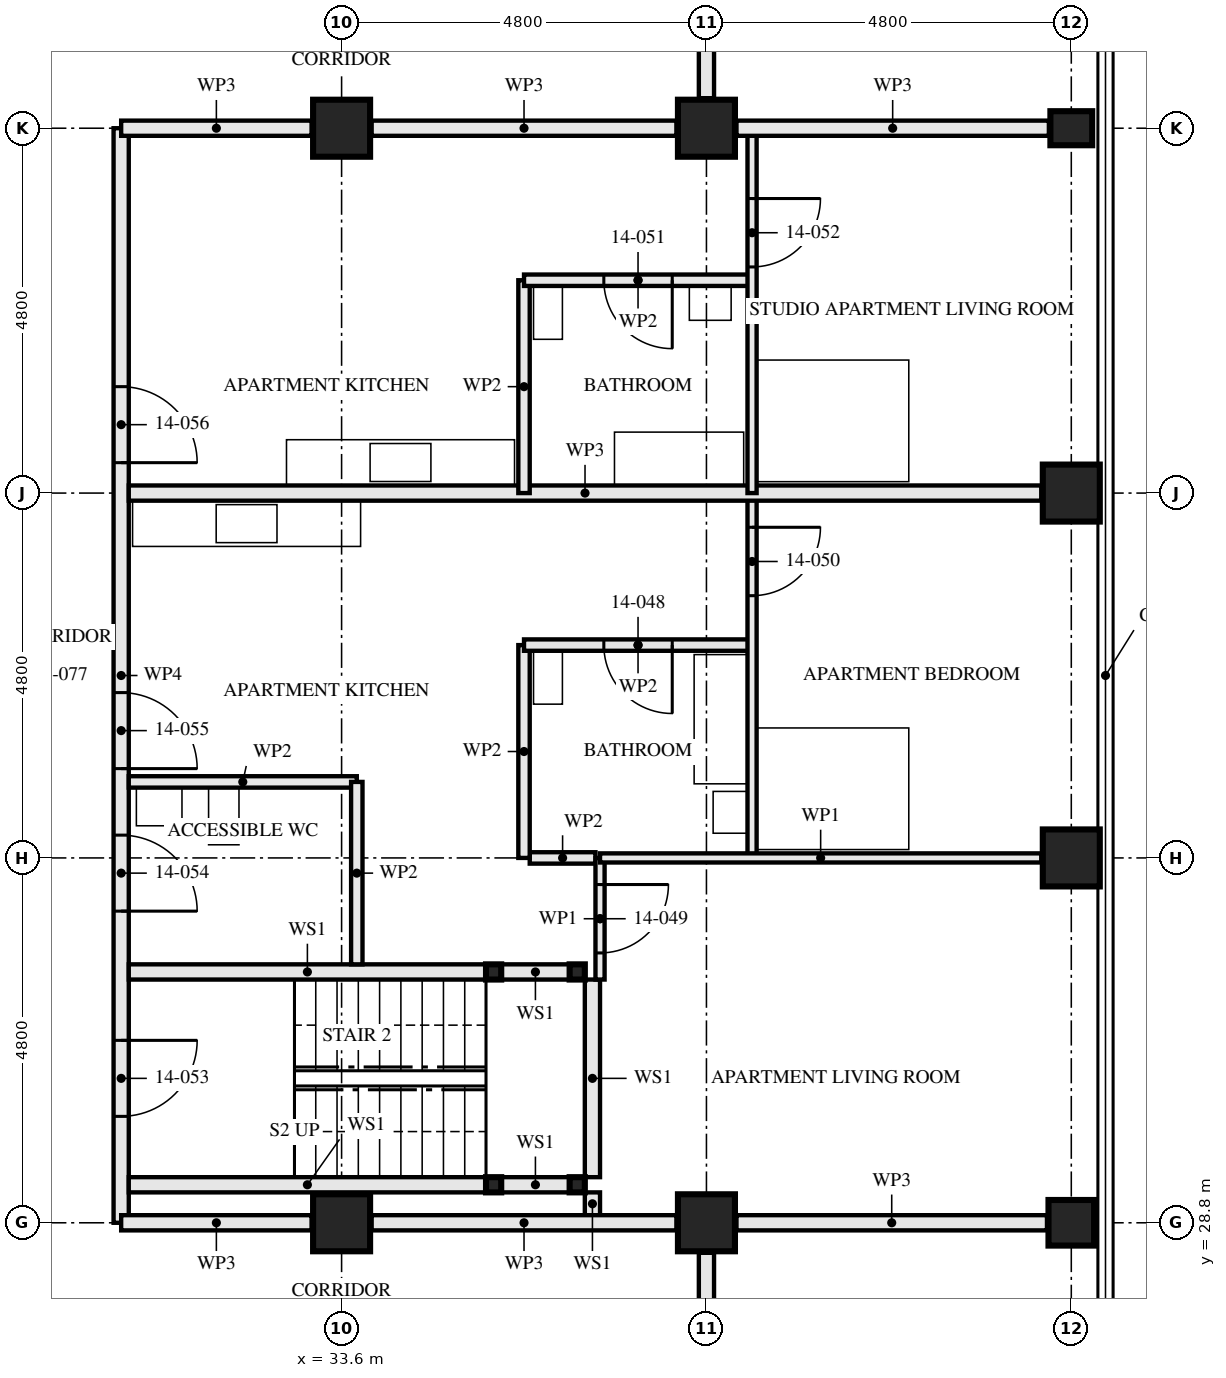
"""IFC4 building model, lengths in metres.
Left out: names, types, materials, properties, quantities, classifications, styles, units other than length and angle.
Written with IfcOpenShell. Run it as: python <this file> out.ifc"""

import sys

from ifc_helpers import new_model, si_unit, direction, frame, frame_2d, origin, origin_2d, place, context, subcontext, project, spatial, rectangle, hollow_rectangle, i_section, extrude, element, fill, save


model = new_model("IFC4")
c1 = context("Model", 3, precision=1e-05, world=origin(), true_north=direction((0.0, 1.0)))
c2 = subcontext(c1, "Body", "Model", "MODEL_VIEW")
j1 = project(units=[si_unit("LENGTHUNIT", "METRE"), si_unit("PLANEANGLEUNIT", "RADIAN")], contexts=[c1])
p1 = place(None, origin())
s1 = spatial("IfcSite", under=j1, at=p1, CompositionType="ELEMENT")
p2 = place(p1, origin())
s2 = spatial("IfcBuilding", under=s1, at=p2, CompositionType="ELEMENT")
p3 = place(p2, frame((0.0, 0.0, 55.0)))
s3 = spatial("IfcBuildingStorey", under=s2, at=p3, CompositionType="ELEMENT", Elevation=55.0)
for number, where, z_axis, x_axis in (
    (1, (33.6, 28.8, 0.0), (0.0, 0.0, 1.0), (0.0, 1.0, 0.0)),
    (2, (33.6, 43.2, 0.0), (0.0, 0.0, 1.0), (0.0, 1.0, 0.0)),
    (3, (38.4, 28.8, 0.0), (0.0, 0.0, 1.0), (0.0, 1.0, 0.0)),
    (4, (38.4, 43.2, 0.0), (0.0, 0.0, 1.0), (0.0, 1.0, 0.0)),
):
    element("IfcColumn", number, at=place(p3, frame(where, z_axis=z_axis, x_axis=x_axis)), inside=s3, PredefinedType="COLUMN", context=c2, shape_type="SweptSolid", body=[
        extrude(hollow_rectangle(XDim=0.75, YDim=0.75, WallThickness=0.08, at=origin_2d()), origin(), (0.0, 0.0, 1.0), 3.5),
    ])
p4 = place(p3, frame((43.2, 28.8, 0.0), z_axis=(0.0, 0.0, 1.0), x_axis=(0.0, 1.0, 0.0)))
e5 = element("IfcColumn", 5, at=p4, inside=s3, PredefinedType="COLUMN", context=c2, shape_type="SweptSolid", body=[
    extrude(hollow_rectangle(XDim=0.6, YDim=0.6, WallThickness=0.08, at=origin_2d()), origin(), (0.0, 0.0, 1.0), 3.5),
])
for number, where, z_axis, x_axis in (
    (6, (43.2, 33.6, 0.0), (0.0, 0.0, 1.0), (1.0, 0.0, 0.0)),
    (7, (43.2, 38.4, 0.0), (0.0, 0.0, 1.0), (1.0, 0.0, 0.0)),
):
    element("IfcColumn", number, at=place(p3, frame(where, z_axis=z_axis, x_axis=x_axis)), inside=s3, PredefinedType="COLUMN", context=c2, shape_type="SweptSolid", body=[
        extrude(hollow_rectangle(XDim=0.75, YDim=0.75, WallThickness=0.08, at=origin_2d()), origin(), (0.0, 0.0, 1.0), 3.5),
    ])
p5 = place(p3, frame((43.2, 43.2, 0.0), z_axis=(0.0, 0.0, 1.0), x_axis=(0.0, 1.0, 0.0)))
e8 = element("IfcColumn", 8, at=p5, inside=s3, PredefinedType="COLUMN", context=c2, shape_type="SweptSolid", body=[
    extrude(i_section(OverallWidth=0.448, OverallDepth=0.55, WebThickness=0.072, FlangeThickness=0.115, FilletRadius=0.015, at=origin_2d()), origin(), (0.0, 0.0, 1.0), 3.5),
])
for number, where, z_axis, x_axis in (
    (9, (36.7, 29.3, 0.0), (0.0, 0.0, 1.0), (1.0, 0.0, 0.0)),
    (10, (36.7, 32.1, 0.0), (0.0, 0.0, 1.0), (1.0, 0.0, 0.0)),
    (11, (35.6, 29.3, 0.0), (0.0, 0.0, 1.0), (1.0, 0.0, 0.0)),
    (12, (35.6, 32.1, 0.0), (0.0, 0.0, 1.0), (1.0, 0.0, 0.0)),
):
    element("IfcColumn", number, at=place(p3, frame(where, z_axis=z_axis, x_axis=x_axis)), inside=s3, PredefinedType="COLUMN", context=c2, shape_type="SweptSolid", body=[
        extrude(hollow_rectangle(XDim=0.2, YDim=0.2, WallThickness=0.008, at=origin_2d()), origin(), (0.0, 0.0, 1.0), 3.33),
    ])
p6 = place(p3, frame((38.4, 26.8, 0.0), z_axis=(0.0, 0.0, 1.0), x_axis=(0.0, 1.0, 0.0)))
e13 = element("IfcWall", 13, at=p6, inside=s3, PredefinedType="PARTITIONING", context=c2, shape_type="SweptSolid", body=[
    extrude(rectangle(XDim=1.605, YDim=0.2, at=frame_2d((0.802, 0.0))), origin(), (0.0, 0.0, 1.0), 3.33),
])
p7 = place(p3, frame((36.6, 29.3, 0.0), z_axis=(0.0, 0.0, 1.0), x_axis=(-1.0, 0.0, 0.0)))
e14 = element("IfcWall", 14, at=p7, inside=s3, PredefinedType="SOLIDWALL", context=c2, shape_type="SweptSolid", body=[
    extrude(rectangle(XDim=0.9, YDim=0.2, at=frame_2d((0.45, 0.0))), origin(), (0.0, 0.0, 1.0), 2.99),
])
p8 = place(p3, frame((35.5, 29.3, 0.0), z_axis=(0.0, 0.0, 1.0), x_axis=(-1.0, 0.0, 0.0)))
e15 = element("IfcWall", 15, at=p8, inside=s3, PredefinedType="SOLIDWALL", context=c2, shape_type="SweptSolid", body=[
    extrude(rectangle(XDim=4.7, YDim=0.2, at=frame_2d((2.35, 0.0))), origin(), (0.0, 0.0, 1.0), 2.99),
])
p9 = place(p3, frame((36.6, 32.1, 0.0), z_axis=(0.0, 0.0, 1.0), x_axis=(-1.0, 0.0, 0.0)))
e16 = element("IfcWall", 16, at=p9, inside=s3, PredefinedType="SOLIDWALL", context=c2, shape_type="SweptSolid", body=[
    extrude(rectangle(XDim=0.9, YDim=0.2, at=frame_2d((0.45, 0.0))), origin(), (0.0, 0.0, 1.0), 2.99),
])
p10 = place(p3, frame((35.5, 32.1, 0.0), z_axis=(0.0, 0.0, 1.0), x_axis=(-1.0, 0.0, 0.0)))
e17 = element("IfcWall", 17, at=p10, inside=s3, PredefinedType="SOLIDWALL", context=c2, shape_type="SweptSolid", body=[
    extrude(rectangle(XDim=4.7, YDim=0.2, at=frame_2d((2.35, 0.0))), origin(), (0.0, 0.0, 1.0), 2.99),
])
p11 = place(p3, frame((36.9, 28.9, 0.0), z_axis=(0.0, 0.0, 1.0), x_axis=(0.0, 1.0, 0.0)))
e18 = element("IfcWall", 18, at=p11, inside=s3, PredefinedType="SOLIDWALL", context=c2, shape_type="SweptSolid", body=[
    extrude(rectangle(XDim=0.3, YDim=0.2, at=frame_2d((0.15, 0.0))), origin(), (0.0, 0.0, 1.0), 3.33),
])
p12 = place(p3, frame((36.9, 29.4, 0.0), z_axis=(0.0, 0.0, 1.0), x_axis=(0.0, 1.0, 0.0)))
e19 = element("IfcWall", 19, at=p12, inside=s3, PredefinedType="SOLIDWALL", context=c2, shape_type="SweptSolid", body=[
    extrude(rectangle(XDim=2.6, YDim=0.2, at=frame_2d((1.3, 0.0))), origin(), (0.0, 0.0, 1.0), 3.33),
])
p13 = place(p3, frame((33.8, 32.2, 0.0), z_axis=(0.0, 0.0, 1.0), x_axis=(0.0, 1.0, 0.0)))
e20 = element("IfcWall", 20, at=p13, inside=s3, PredefinedType="PARTITIONING", context=c2, shape_type="SweptSolid", body=[
    extrude(rectangle(XDim=2.4, YDim=0.15, at=frame_2d((1.2, 0.0))), origin(), (0.0, 0.0, 1.0), 2.55),
])
p14 = place(p3, frame((33.8, 34.6, 0.0), z_axis=(0.0, 0.0, 1.0), x_axis=(-1.0, 0.0, 0.0)))
e21 = element("IfcWall", 21, at=p14, inside=s3, PredefinedType="PARTITIONING", context=c2, shape_type="SweptSolid", body=[
    extrude(rectangle(XDim=3.0, YDim=0.15, at=frame_2d((1.5, 0.0))), origin(), (0.0, 0.0, 1.0), 3.33),
])
p15 = place(p3, frame((39.0, 36.4, 0.0), z_axis=(0.0, 0.0, 1.0), x_axis=(-1.0, 0.0, 0.0)))
e22 = element("IfcWall", 22, at=p15, inside=s3, PredefinedType="PARTITIONING", context=c2, shape_type="SweptSolid", body=[
    extrude(rectangle(XDim=3.0, YDim=0.15, at=frame_2d((1.5, 0.0))), origin(), (0.0, 0.0, 1.0), 3.33),
])
p16 = place(p15, frame((1.05, 0.0, 0.0)))
e23 = element("IfcOpeningElement", 23, at=p16, cuts=e22, PredefinedType="OPENING", context=c2, shape_type="SweptSolid", body=[
    extrude(rectangle(XDim=0.9, YDim=2.1, at=frame_2d((0.45, 1.05))), frame((0.0, 0.085, 0.0), z_axis=(0.0, -1.0, 0.0), x_axis=(1.0, 0.0, 0.0)), (0.0, 0.0, 1.0), 0.171),
])
p17 = place(p3, frame((36.0, 33.6, 0.0), z_axis=(0.0, 0.0, 1.0), x_axis=(0.0, 1.0, 0.0)))
e24 = element("IfcWall", 24, at=p17, inside=s3, PredefinedType="PARTITIONING", context=c2, shape_type="SweptSolid", body=[
    extrude(rectangle(XDim=2.8, YDim=0.15, at=frame_2d((1.4, 0.0))), origin(), (0.0, 0.0, 1.0), 3.33),
])
p18 = place(p3, frame((37.0, 32.0, 0.0), z_axis=(0.0, 0.0, 1.0), x_axis=(0.0, 1.0, 0.0)))
e25 = element("IfcWall", 25, at=p18, inside=s3, PredefinedType="PARTITIONING", context=c2, shape_type="SweptSolid", body=[
    extrude(rectangle(XDim=1.6, YDim=0.12, at=frame_2d((0.8, 0.0))), origin(), (0.0, 0.0, 1.0), 3.33),
])
p19 = place(p18, frame((0.35, 0.0, 0.0)))
e26 = element("IfcOpeningElement", 26, at=p19, cuts=e25, PredefinedType="OPENING", context=c2, shape_type="SweptSolid", body=[
    extrude(rectangle(XDim=0.9, YDim=2.1, at=frame_2d((0.45, 1.05))), frame((0.0, 0.071, 0.0), z_axis=(0.0, -1.0, 0.0), x_axis=(1.0, 0.0, 0.0)), (0.0, 0.0, 1.0), 0.141),
])
p20 = place(p3, frame((39.0, 33.6, 0.0), z_axis=(0.0, 0.0, 1.0), x_axis=(0.0, 1.0, 0.0)))
e27 = element("IfcWall", 27, at=p20, inside=s3, PredefinedType="PARTITIONING", context=c2, shape_type="SweptSolid", body=[
    extrude(rectangle(XDim=4.8, YDim=0.12, at=frame_2d((2.4, 0.0))), origin(), (0.0, 0.0, 1.0), 3.33),
])
p21 = place(p20, frame((3.45, 0.0, 0.0)))
e28 = element("IfcOpeningElement", 28, at=p21, cuts=e27, PredefinedType="OPENING", context=c2, shape_type="SweptSolid", body=[
    extrude(rectangle(XDim=0.9, YDim=2.1, at=frame_2d((0.45, 1.05))), frame((0.0, 0.071, 0.0), z_axis=(0.0, -1.0, 0.0), x_axis=(1.0, 0.0, 0.0)), (0.0, 0.0, 1.0), 0.141),
])
p22 = place(p3, frame((42.805, 33.6, 0.0), z_axis=(0.0, 0.0, 1.0), x_axis=(-1.0, 0.0, 0.0)))
e29 = element("IfcWall", 29, at=p22, inside=s3, PredefinedType="PARTITIONING", context=c2, shape_type="SweptSolid", body=[
    extrude(rectangle(XDim=5.805, YDim=0.12, at=frame_2d((2.902, 0.0))), origin(), (0.0, 0.0, 1.0), 2.55),
])
p23 = place(p3, frame((42.805, 38.4, 0.0), z_axis=(0.0, 0.0, 1.0), x_axis=(-1.0, 0.0, 0.0)))
e30 = element("IfcWall", 30, at=p23, inside=s3, PredefinedType="PARTITIONING", context=c2, shape_type="SweptSolid", body=[
    extrude(rectangle(XDim=12.005, YDim=0.2, at=frame_2d((6.002, 0.0))), origin(), (0.0, 0.0, 1.0), 2.55),
])
p24 = place(p3, frame((39.0, 41.2, 0.0), z_axis=(0.0, 0.0, 1.0), x_axis=(-1.0, 0.0, 0.0)))
e31 = element("IfcWall", 31, at=p24, inside=s3, PredefinedType="PARTITIONING", context=c2, shape_type="SweptSolid", body=[
    extrude(rectangle(XDim=3.0, YDim=0.15, at=frame_2d((1.5, 0.0))), origin(), (0.0, 0.0, 1.0), 3.33),
])
p25 = place(p24, frame((1.05, 0.0, 0.0)))
e32 = element("IfcOpeningElement", 32, at=p25, cuts=e31, PredefinedType="OPENING", context=c2, shape_type="SweptSolid", body=[
    extrude(rectangle(XDim=0.9, YDim=2.1, at=frame_2d((0.45, 1.05))), frame((0.0, 0.085, 0.0), z_axis=(0.0, -1.0, 0.0), x_axis=(1.0, 0.0, 0.0)), (0.0, 0.0, 1.0), 0.171),
])
p26 = place(p3, frame((36.0, 38.4, 0.0), z_axis=(0.0, 0.0, 1.0), x_axis=(0.0, 1.0, 0.0)))
e33 = element("IfcWall", 33, at=p26, inside=s3, PredefinedType="PARTITIONING", context=c2, shape_type="SweptSolid", body=[
    extrude(rectangle(XDim=2.8, YDim=0.15, at=frame_2d((1.4, 0.0))), origin(), (0.0, 0.0, 1.0), 3.33),
])
p27 = place(p3, frame((39.0, 38.4, 0.0), z_axis=(0.0, 0.0, 1.0), x_axis=(0.0, 1.0, 0.0)))
e34 = element("IfcWall", 34, at=p27, inside=s3, PredefinedType="PARTITIONING", context=c2, shape_type="SweptSolid", body=[
    extrude(rectangle(XDim=4.8, YDim=0.12, at=frame_2d((2.4, 0.0))), origin(), (0.0, 0.0, 1.0), 3.33),
])
p28 = place(p27, frame((2.975, 0.0, 0.0)))
e35 = element("IfcOpeningElement", 35, at=p28, cuts=e34, PredefinedType="OPENING", context=c2, shape_type="SweptSolid", body=[
    extrude(rectangle(XDim=0.9, YDim=2.1, at=frame_2d((0.45, 1.05))), frame((0.0, 0.071, 0.0), z_axis=(0.0, -1.0, 0.0), x_axis=(1.0, 0.0, 0.0)), (0.0, 0.0, 1.0), 0.141),
])
p29 = place(p3, frame((30.7, 28.8, 0.0), z_axis=(0.0, 0.0, 1.0), x_axis=(0.0, 1.0, 0.0)))
e36 = element("IfcWall", 36, at=p29, inside=s3, PredefinedType="PARTITIONING", context=c2, shape_type="SweptSolid", body=[
    extrude(rectangle(XDim=14.4, YDim=0.2, at=frame_2d((7.2, 0.0))), origin(), (0.0, 0.0, 1.0), 2.55),
])
p30 = place(p29, frame((1.4, 0.0, 0.0)))
e37 = element("IfcOpeningElement", 37, at=p30, cuts=e36, PredefinedType="OPENING", context=c2, shape_type="SweptSolid", body=[
    extrude(rectangle(XDim=1.0, YDim=2.1, at=frame_2d((0.5, 1.05))), frame((0.0, 0.111, 0.0), z_axis=(0.0, -1.0, 0.0), x_axis=(1.0, 0.0, 0.0)), (0.0, 0.0, 1.0), 0.221),
])
p31 = place(p29, frame((4.1, 0.0, 0.0)))
e38 = element("IfcOpeningElement", 38, at=p31, cuts=e36, PredefinedType="OPENING", context=c2, shape_type="SweptSolid", body=[
    extrude(rectangle(XDim=1.0, YDim=2.1, at=frame_2d((0.5, 1.05))), frame((0.0, 0.111, 0.0), z_axis=(0.0, -1.0, 0.0), x_axis=(1.0, 0.0, 0.0)), (0.0, 0.0, 1.0), 0.221),
])
p32 = place(p29, frame((5.975, 0.0, 0.0)))
e39 = element("IfcOpeningElement", 39, at=p32, cuts=e36, PredefinedType="OPENING", context=c2, shape_type="SweptSolid", body=[
    extrude(rectangle(XDim=1.0, YDim=2.1, at=frame_2d((0.5, 1.05))), frame((0.0, 0.111, 0.0), z_axis=(0.0, -1.0, 0.0), x_axis=(1.0, 0.0, 0.0)), (0.0, 0.0, 1.0), 0.221),
])
p33 = place(p29, frame((10.0, 0.0, 0.0)))
e40 = element("IfcOpeningElement", 40, at=p33, cuts=e36, PredefinedType="OPENING", context=c2, shape_type="SweptSolid", body=[
    extrude(rectangle(XDim=1.0, YDim=2.1, at=frame_2d((0.5, 1.05))), frame((0.0, 0.111, 0.0), z_axis=(0.0, -1.0, 0.0), x_axis=(1.0, 0.0, 0.0)), (0.0, 0.0, 1.0), 0.221),
])
p34 = place(p3, frame((38.4, 45.2, 0.0), z_axis=(0.0, 0.0, 1.0), x_axis=(0.0, -1.0, 0.0)))
e41 = element("IfcWall", 41, at=p34, inside=s3, PredefinedType="PARTITIONING", context=c2, shape_type="SweptSolid", body=[
    extrude(rectangle(XDim=1.605, YDim=0.2, at=frame_2d((0.802, 0.0))), origin(), (0.0, 0.0, 1.0), 3.33),
])
p35 = place(p3, frame((42.88, 28.8, 0.0), z_axis=(0.0, 0.0, 1.0), x_axis=(-1.0, 0.0, 0.0)))
e42 = element("IfcWall", 42, at=p35, inside=s3, PredefinedType="PARTITIONING", context=c2, shape_type="SweptSolid", body=[
    extrude(rectangle(XDim=4.085, YDim=0.2, at=frame_2d((2.042, 0.0))), origin(), (0.0, 0.0, 1.0), 2.32),
])
p36 = place(p3, frame((38.005, 28.8, 0.0), z_axis=(0.0, 0.0, 1.0), x_axis=(-1.0, 0.0, 0.0)))
e43 = element("IfcWall", 43, at=p36, inside=s3, PredefinedType="PARTITIONING", context=c2, shape_type="SweptSolid", body=[
    extrude(rectangle(XDim=4.01, YDim=0.2, at=frame_2d((2.005, 0.0))), origin(), (0.0, 0.0, 1.0), 2.32),
])
p37 = place(p3, frame((33.205, 28.8, 0.0), z_axis=(0.0, 0.0, 1.0), x_axis=(-1.0, 0.0, 0.0)))
e44 = element("IfcWall", 44, at=p37, inside=s3, PredefinedType="PARTITIONING", context=c2, shape_type="SweptSolid", body=[
    extrude(rectangle(XDim=2.505, YDim=0.2, at=frame_2d((1.252, 0.0))), origin(), (0.0, 0.0, 1.0), 2.32),
])
p38 = place(p3, frame((42.905, 43.2, 0.0), z_axis=(0.0, 0.0, 1.0), x_axis=(-1.0, 0.0, 0.0)))
e45 = element("IfcWall", 45, at=p38, inside=s3, PredefinedType="PARTITIONING", context=c2, shape_type="SweptSolid", body=[
    extrude(rectangle(XDim=4.11, YDim=0.2, at=frame_2d((2.055, 0.0))), origin(), (0.0, 0.0, 1.0), 2.32),
])
p39 = place(p3, frame((38.005, 43.2, 0.0), z_axis=(0.0, 0.0, 1.0), x_axis=(-1.0, 0.0, 0.0)))
e46 = element("IfcWall", 46, at=p39, inside=s3, PredefinedType="PARTITIONING", context=c2, shape_type="SweptSolid", body=[
    extrude(rectangle(XDim=4.01, YDim=0.2, at=frame_2d((2.005, 0.0))), origin(), (0.0, 0.0, 1.0), 2.32),
])
p40 = place(p3, frame((33.205, 43.2, 0.0), z_axis=(0.0, 0.0, 1.0), x_axis=(-1.0, 0.0, 0.0)))
e47 = element("IfcWall", 47, at=p40, inside=s3, PredefinedType="PARTITIONING", context=c2, shape_type="SweptSolid", body=[
    extrude(rectangle(XDim=2.505, YDim=0.2, at=frame_2d((1.252, 0.0))), origin(), (0.0, 0.0, 1.0), 2.32),
])
p41 = place(p3, frame((36.94, 33.6, 0.0), z_axis=(0.0, 0.0, 1.0), x_axis=(-1.0, 0.0, 0.0)))
e48 = element("IfcWall", 48, at=p41, inside=s3, PredefinedType="PARTITIONING", context=c2, shape_type="SweptSolid", body=[
    extrude(rectangle(XDim=0.865, YDim=0.15, at=frame_2d((0.433, 0.0))), origin(), (0.0, 0.0, 1.0), 2.55),
])
p42 = place(p16, origin())
e49 = element("IfcDoor", 49, at=p42, inside=s3, OperationType="SINGLE_SWING_RIGHT", PredefinedType="DOOR", context=c2, shape_type="SweptSolid", body=[
    extrude(rectangle(XDim=0.9, YDim=2.1, at=frame_2d((0.45, 1.05))), frame((0.0, 0.022, 0.0), z_axis=(0.0, -1.0, 0.0), x_axis=(1.0, 0.0, 0.0)), (0.0, 0.0, 1.0), 0.044),
])
fill(e23, e49)
p43 = place(p19, frame((0.9, 0.0, 0.0), z_axis=(0.0, 0.0, 1.0), x_axis=(-1.0, 0.0, 0.0)))
e50 = element("IfcDoor", 50, at=p43, inside=s3, OperationType="SINGLE_SWING_RIGHT", PredefinedType="DOOR", context=c2, shape_type="SweptSolid", body=[
    extrude(rectangle(XDim=0.9, YDim=2.1, at=frame_2d((0.45, 1.05))), frame((0.0, 0.022, 0.0), z_axis=(0.0, -1.0, 0.0), x_axis=(1.0, 0.0, 0.0)), (0.0, 0.0, 1.0), 0.044),
])
fill(e26, e50)
p44 = place(p21, frame((0.9, 0.0, 0.0), z_axis=(0.0, 0.0, 1.0), x_axis=(-1.0, 0.0, 0.0)))
e51 = element("IfcDoor", 51, at=p44, inside=s3, OperationType="SINGLE_SWING_RIGHT", PredefinedType="DOOR", context=c2, shape_type="SweptSolid", body=[
    extrude(rectangle(XDim=0.9, YDim=2.1, at=frame_2d((0.45, 1.05))), frame((0.0, 0.022, 0.0), z_axis=(0.0, -1.0, 0.0), x_axis=(1.0, 0.0, 0.0)), (0.0, 0.0, 1.0), 0.044),
])
fill(e28, e51)
p45 = place(p25, origin())
e52 = element("IfcDoor", 52, at=p45, inside=s3, OperationType="SINGLE_SWING_RIGHT", PredefinedType="DOOR", context=c2, shape_type="SweptSolid", body=[
    extrude(rectangle(XDim=0.9, YDim=2.1, at=frame_2d((0.45, 1.05))), frame((0.0, 0.022, 0.0), z_axis=(0.0, -1.0, 0.0), x_axis=(1.0, 0.0, 0.0)), (0.0, 0.0, 1.0), 0.044),
])
fill(e32, e52)
p46 = place(p28, frame((0.9, 0.0, 0.0), z_axis=(0.0, 0.0, 1.0), x_axis=(-1.0, 0.0, 0.0)))
e53 = element("IfcDoor", 53, at=p46, inside=s3, OperationType="SINGLE_SWING_RIGHT", PredefinedType="DOOR", context=c2, shape_type="SweptSolid", body=[
    extrude(rectangle(XDim=0.9, YDim=2.1, at=frame_2d((0.45, 1.05))), frame((0.0, 0.022, 0.0), z_axis=(0.0, -1.0, 0.0), x_axis=(1.0, 0.0, 0.0)), (0.0, 0.0, 1.0), 0.044),
])
fill(e35, e53)
p47 = place(p30, frame((1.0, 0.0, 0.0), z_axis=(0.0, 0.0, 1.0), x_axis=(-1.0, 0.0, 0.0)))
e54 = element("IfcDoor", 54, at=p47, inside=s3, OperationType="SINGLE_SWING_RIGHT", PredefinedType="DOOR", context=c2, shape_type="SweptSolid", body=[
    extrude(rectangle(XDim=1.0, YDim=2.1, at=frame_2d((0.5, 1.05))), frame((0.0, 0.032, 0.0), z_axis=(0.0, -1.0, 0.0), x_axis=(1.0, 0.0, 0.0)), (0.0, 0.0, 1.0), 0.064),
])
fill(e37, e54)
p48 = place(p31, frame((1.0, 0.0, 0.0), z_axis=(0.0, 0.0, 1.0), x_axis=(-1.0, 0.0, 0.0)))
e55 = element("IfcDoor", 55, at=p48, inside=s3, OperationType="SINGLE_SWING_LEFT", PredefinedType="DOOR", context=c2, shape_type="SweptSolid", body=[
    extrude(rectangle(XDim=1.0, YDim=2.1, at=frame_2d((0.5, 1.05))), frame((0.0, 0.027, 0.0), z_axis=(0.0, -1.0, 0.0), x_axis=(1.0, 0.0, 0.0)), (0.0, 0.0, 1.0), 0.054),
])
fill(e38, e55)
p49 = place(p32, frame((1.0, 0.0, 0.0), z_axis=(0.0, 0.0, 1.0), x_axis=(-1.0, 0.0, 0.0)))
e56 = element("IfcDoor", 56, at=p49, inside=s3, OperationType="SINGLE_SWING_LEFT", PredefinedType="DOOR", context=c2, shape_type="SweptSolid", body=[
    extrude(rectangle(XDim=1.0, YDim=2.1, at=frame_2d((0.5, 1.05))), frame((0.0, 0.027, 0.0), z_axis=(0.0, -1.0, 0.0), x_axis=(1.0, 0.0, 0.0)), (0.0, 0.0, 1.0), 0.054),
])
fill(e39, e56)
p50 = place(p33, frame((1.0, 0.0, 0.0), z_axis=(0.0, 0.0, 1.0), x_axis=(-1.0, 0.0, 0.0)))
e57 = element("IfcDoor", 57, at=p50, inside=s3, OperationType="SINGLE_SWING_LEFT", PredefinedType="DOOR", context=c2, shape_type="SweptSolid", body=[
    extrude(rectangle(XDim=1.0, YDim=2.1, at=frame_2d((0.5, 1.05))), frame((0.0, 0.027, 0.0), z_axis=(0.0, -1.0, 0.0), x_axis=(1.0, 0.0, 0.0)), (0.0, 0.0, 1.0), 0.054),
])
fill(e40, e57)
save(model, sys.argv[1])
